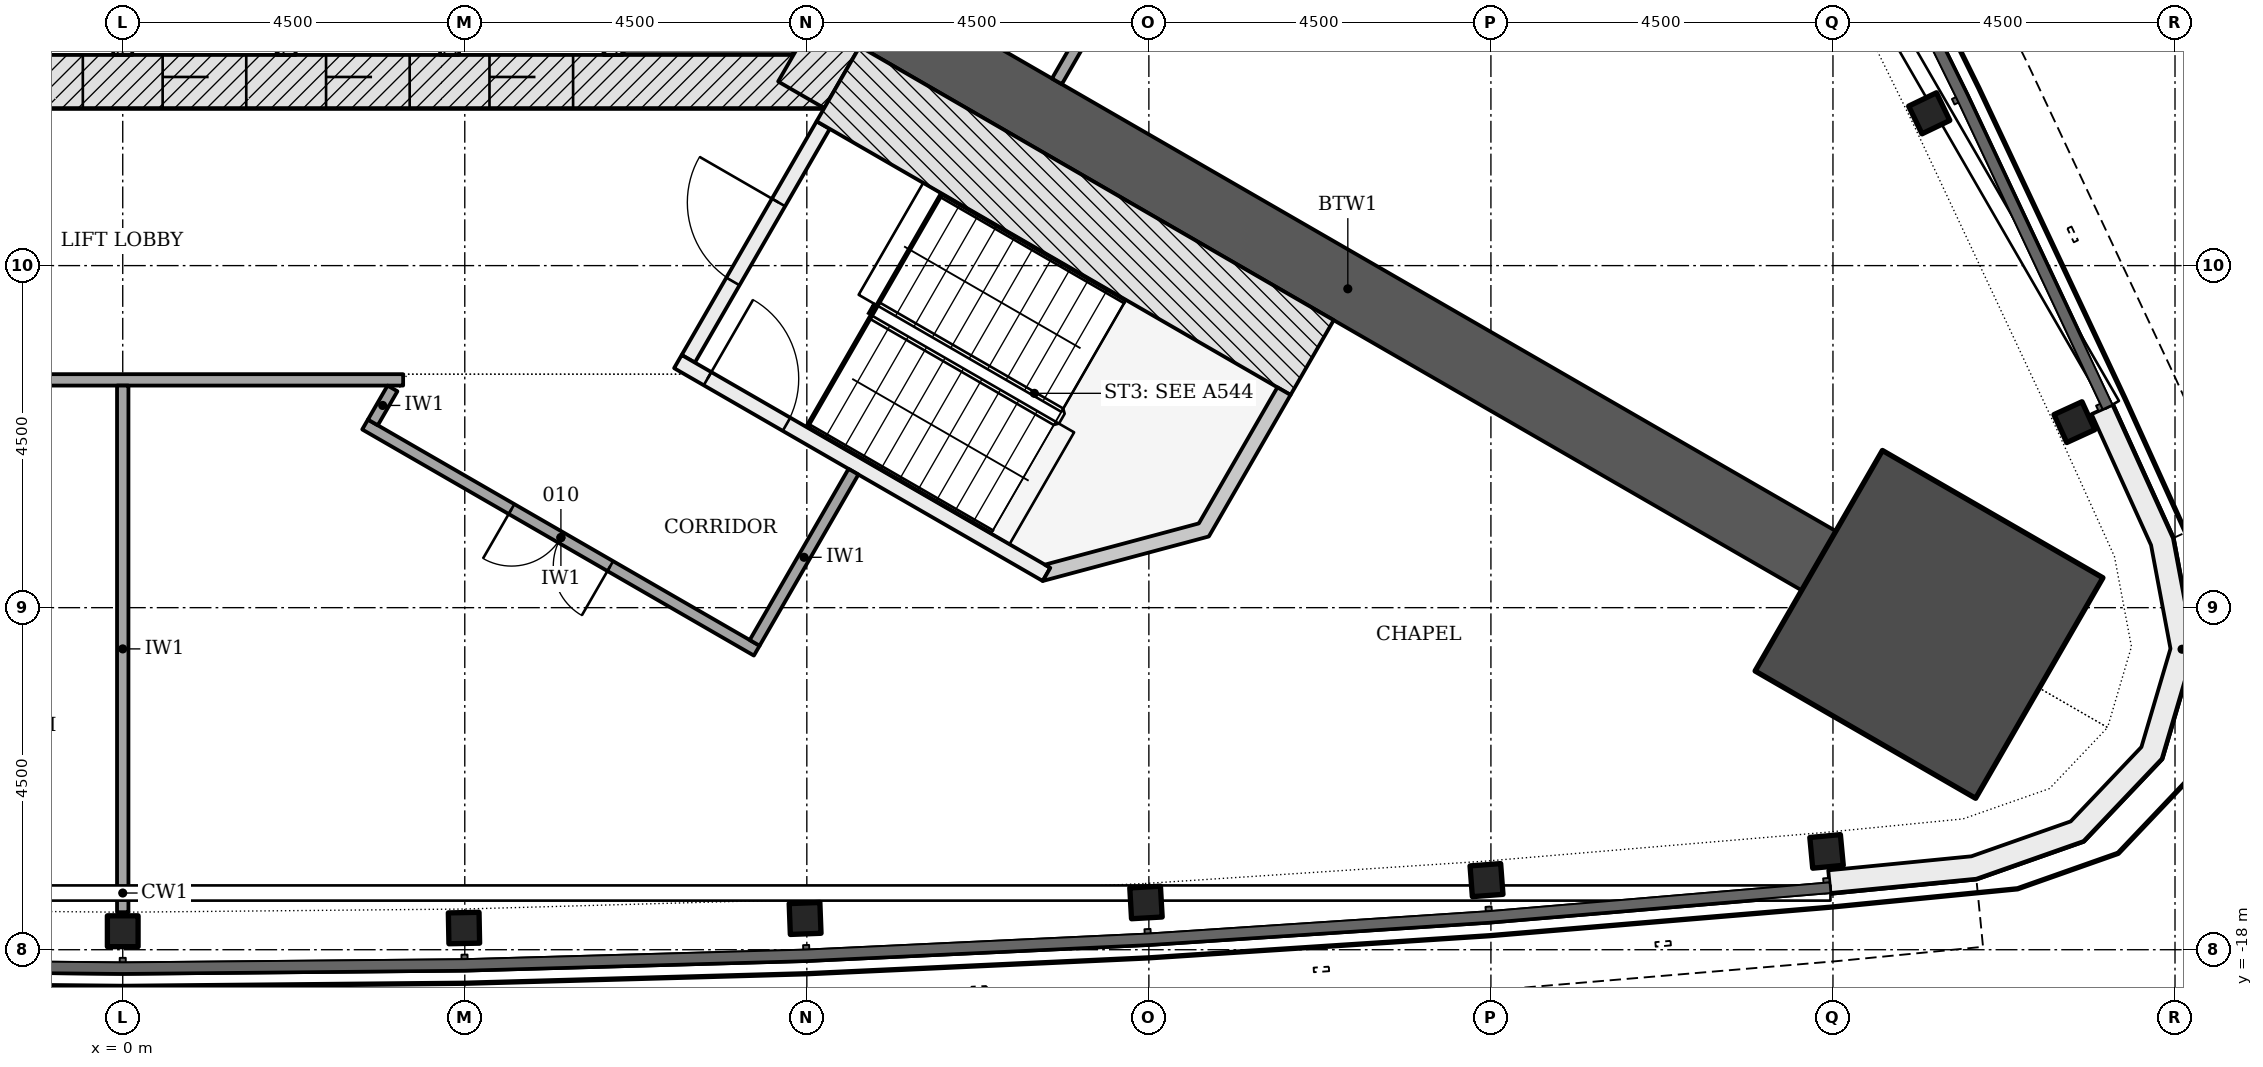
"""IFC4 building model, lengths in metres.
Left out: names, types, materials, properties, quantities, classifications, styles, units other than length and angle.
Written with IfcOpenShell. Run it as: python <this file> out.ifc"""

import sys

from ifc_helpers import new_model, si_unit, direction, frame, frame_2d, origin, origin_2d, place, context, subcontext, project, spatial, polyline, rectangle, i_section, outline, extrude, element, fill, save


model = new_model("IFC4")
c1 = context("Model", 3, precision=1e-05, world=origin(), true_north=direction((0.0, 1.0)))
c2 = subcontext(c1, "Body", "Model", "MODEL_VIEW")
j1 = project(units=[si_unit("LENGTHUNIT", "METRE"), si_unit("PLANEANGLEUNIT", "RADIAN")], contexts=[c1])
p1 = place(None, origin())
s1 = spatial("IfcSite", under=j1, at=p1, CompositionType="ELEMENT")
p2 = place(p1, origin())
s2 = spatial("IfcBuilding", under=s1, at=p2, CompositionType="ELEMENT")
p3 = place(p2, frame((0.0, 0.0, 34.8)))
s3 = spatial("IfcBuildingStorey", under=s2, at=p3, CompositionType="ELEMENT", Elevation=34.8)
p4 = place(p3, frame((-9.229, -6.578, -0.2), z_axis=(0.0, 0.0, 1.0), x_axis=(1.0, 0.0, 0.0)))
e1 = element("IfcWall", 1, at=p4, inside=s3, PredefinedType="SHEAR", context=c2, shape_type="SweptSolid", body=[
    extrude(rectangle(XDim=18.458, YDim=0.7, at=frame_2d((9.229, 0.0))), origin(), (0.0, 0.0, 1.0), 3.6),
])
p5 = place(p4, frame((3.304, 0.0, 0.2)))
e2 = element("IfcOpeningElement", 2, at=p5, cuts=e1, PredefinedType="OPENING", context=c2, shape_type="SweptSolid", body=[
    extrude(rectangle(XDim=1.1, YDim=2.1, at=frame_2d((0.55, 1.05))), frame((0.0, 0.36, 0.0), z_axis=(0.0, -1.0, 0.0), x_axis=(1.0, 0.0, 0.0)), (0.0, 0.0, 1.0), 0.72),
])
p6 = place(p4, frame((5.454, 0.0, 0.2)))
e3 = element("IfcOpeningElement", 3, at=p6, cuts=e1, PredefinedType="OPENING", context=c2, shape_type="SweptSolid", body=[
    extrude(rectangle(XDim=1.1, YDim=2.1, at=frame_2d((0.55, 1.05))), frame((0.0, 0.36, 0.0), z_axis=(0.0, -1.0, 0.0), x_axis=(1.0, 0.0, 0.0)), (0.0, 0.0, 1.0), 0.72),
])
p7 = place(p4, frame((7.604, 0.0, 0.2)))
e4 = element("IfcOpeningElement", 4, at=p7, cuts=e1, PredefinedType="OPENING", context=c2, shape_type="SweptSolid", body=[
    extrude(rectangle(XDim=1.1, YDim=2.1, at=frame_2d((0.55, 1.05))), frame((0.0, 0.36, 0.0), z_axis=(0.0, -1.0, 0.0), x_axis=(1.0, 0.0, 0.0)), (0.0, 0.0, 1.0), 0.72),
])
p8 = place(p4, frame((9.754, 0.0, 0.2)))
e5 = element("IfcOpeningElement", 5, at=p8, cuts=e1, PredefinedType="OPENING", context=c2, shape_type="SweptSolid", body=[
    extrude(rectangle(XDim=1.1, YDim=2.1, at=frame_2d((0.55, 1.05))), frame((0.0, 0.36, 0.0), z_axis=(0.0, -1.0, 0.0), x_axis=(1.0, 0.0, 0.0)), (0.0, 0.0, 1.0), 0.72),
])
p9 = place(p4, frame((11.904, 0.0, 0.2)))
e6 = element("IfcOpeningElement", 6, at=p9, cuts=e1, PredefinedType="OPENING", context=c2, shape_type="SweptSolid", body=[
    extrude(rectangle(XDim=1.1, YDim=2.1, at=frame_2d((0.55, 1.05))), frame((0.0, 0.36, 0.0), z_axis=(0.0, -1.0, 0.0), x_axis=(1.0, 0.0, 0.0)), (0.0, 0.0, 1.0), 0.72),
])
p10 = place(p4, frame((14.054, 0.0, 0.2)))
e7 = element("IfcOpeningElement", 7, at=p10, cuts=e1, PredefinedType="OPENING", context=c2, shape_type="SweptSolid", body=[
    extrude(rectangle(XDim=1.1, YDim=2.1, at=frame_2d((0.55, 1.05))), frame((0.0, 0.36, 0.0), z_axis=(0.0, -1.0, 0.0), x_axis=(1.0, 0.0, 0.0)), (0.0, 0.0, 1.0), 0.72),
])
p11 = place(p4, frame((1.079, 0.0, 0.2)))
e8 = element("IfcOpeningElement", 8, at=p11, cuts=e1, PredefinedType="OPENING", context=c2, shape_type="SweptSolid", body=[
    extrude(rectangle(XDim=0.9, YDim=2.1, at=frame_2d((0.45, 1.05))), frame((0.0, 0.36, 0.0), z_axis=(0.0, -1.0, 0.0), x_axis=(1.0, 0.0, 0.0)), (0.0, 0.0, 1.0), 0.72),
])
p12 = place(p3, frame((8.926, -6.753, -0.2), z_axis=(0.0, 0.0, 1.0), x_axis=(0.500042739161, 0.866000726912, 0.0)))
e9 = element("IfcWall", 9, at=p12, inside=s3, PredefinedType="SHEAR", context=c2, shape_type="SweptSolid", body=[
    extrude(rectangle(XDim=2.771, YDim=0.7, at=frame_2d((1.386, 0.0))), origin(), (0.0, 0.0, 1.0), 3.6),
])
p13 = place(p3, frame((9.922, -5.728, -0.2), z_axis=(0.0, 0.0, 1.0), x_axis=(0.866025331845, -0.500000124603, 0.0)))
e10 = element("IfcWall", 10, at=p13, inside=s3, PredefinedType="SHEAR", context=c2, shape_type="SweptSolid", body=[
    extrude(rectangle(XDim=14.309, YDim=0.9, at=frame_2d((7.154, 0.0))), origin(), (0.0, 0.0, 1.0), 3.6),
])
p14 = place(p3, frame((23.764, -13.72, -0.2), z_axis=(0.0, 0.0, 1.0), x_axis=(0.866025403784, -0.5, 0.0)))
e11 = element("IfcColumn", 11, at=p14, inside=s3, PredefinedType="COLUMN", context=c2, shape_type="SweptSolid", body=[
    extrude(rectangle(XDim=3.35, YDim=3.35, at=origin_2d()), origin(), (0.0, 0.0, 1.0), 3.6),
])
for number, where, z_axis, x_axis in (
    (12, (0.0, -17.757, -0.2), (0.0, 0.0, 1.0), (1.0, 0.0, 0.0)),
    (13, (4.49, -17.715, -0.2), (0.0, 0.0, 1.0), (1.0, 0.019, 0.0)),
    (14, (8.977, -17.589, -0.2), (0.0, 0.0, 1.0), (0.999, 0.037, 0.0)),
    (15, (13.462, -17.379, -0.2), (0.0, 0.0, 1.0), (0.998, 0.056, 0.0)),
    (16, (17.942, -17.084, -0.2), (0.0, 0.0, 1.0), (0.997, 0.075, 0.0)),
    (17, (22.416, -16.707, -0.2), (0.0, 0.0, 1.0), (0.996, 0.094, 0.0)),
    (18, (25.676, -11.059, -0.2), (0.0, 0.0, 1.0), (-0.417, 0.909, 0.0)),
    (19, (23.767, -6.996, -0.2), (0.0, 0.0, 1.0), (-0.434, 0.901, 0.0)),
):
    element("IfcColumn", number, at=place(p3, frame(where, z_axis=z_axis, x_axis=x_axis)), inside=s3, PredefinedType="COLUMN", context=c2, shape_type="SweptSolid", body=[
        extrude(i_section(OverallWidth=0.404, OverallDepth=0.406, WebThickness=0.027, FlangeThickness=0.044, FilletRadius=0.015, at=origin_2d()), origin(), (0.0, 0.0, 1.0), 3.6),
    ])
p15 = place(p3, origin())
e20 = element("IfcWall", 20, at=p15, inside=s3, PredefinedType="NOTDEFINED", context=c2, shape_type="SweptSolid", body=[
    extrude(outline(polyline([(22.467, -17.254), (24.386, -17.066), (25.796, -16.571), (26.825, -15.488), (27.249, -14.055), (26.973, -12.586), (26.176, -10.83), (25.903, -10.954), (26.685, -12.677), (26.94, -14.039), (26.558, -15.333), (25.628, -16.312), (24.321, -16.771), (22.438, -16.956), (22.467, -17.254)])), origin(), (0.0, 0.0, 1.0), 3.3),
])
for number, where, z_axis, x_axis in (
    (21, (0.0, -6.228, -0.2), (0.0, 0.0, 1.0), (0.0, 1.0, 0.0)),
    (22, (2.15, -6.228, -0.2), (0.0, 0.0, 1.0), (0.0, 1.0, 0.0)),
    (23, (4.3, -6.228, -0.2), (0.0, 0.0, 1.0), (0.0, 1.0, 0.0)),
    (24, (6.45, -6.228, -0.2), (0.0, 0.0, 1.0), (0.0, 1.0, 0.0)),
):
    element("IfcWall", number, at=place(p3, frame(where, z_axis=z_axis, x_axis=x_axis)), inside=s3, PredefinedType="PARTITIONING", context=c2, shape_type="SweptSolid", body=[
        extrude(rectangle(XDim=2.5, YDim=0.25, at=frame_2d((1.25, 0.0))), origin(), (0.0, 0.0, 1.0), 3.6),
    ])
p16 = place(p3, frame((7.44, -10.226, -0.2), z_axis=(0.0, 0.0, 1.0), x_axis=(0.500022077904, 0.866012656725, 0.0)))
e25 = element("IfcWall", 25, at=p16, inside=s3, PredefinedType="SHEAR", context=c2, shape_type="SweptSolid", body=[
    extrude(rectangle(XDim=3.55, YDim=0.2, at=frame_2d((1.775, 0.0))), origin(), (0.0, 0.0, 1.0), 3.6),
])
p17 = place(p16, frame((1.175, 0.0, 0.2)))
e26 = element("IfcOpeningElement", 26, at=p17, cuts=e25, PredefinedType="OPENING", context=c2, shape_type="SweptSolid", body=[
    extrude(rectangle(XDim=1.2, YDim=2.1, at=frame_2d((0.6, 1.05))), frame((0.0, 0.11, 0.0), z_axis=(0.0, -1.0, 0.0), x_axis=(1.0, 0.0, 0.0)), (0.0, 0.0, 1.0), 0.22),
])
p18 = place(p3, frame((7.304, -10.262, -0.2), z_axis=(0.0, 0.0, 1.0), x_axis=(0.866026594901, -0.49999793692, 0.0)))
e27 = element("IfcWall", 27, at=p18, inside=s3, PredefinedType="SHEAR", context=c2, shape_type="SweptSolid", body=[
    extrude(rectangle(XDim=5.6, YDim=0.2, at=frame_2d((2.8, 0.0))), origin(), (0.0, 0.0, 1.0), 3.6),
])
p19 = place(p18, frame((0.45, 0.0, 0.2)))
e28 = element("IfcOpeningElement", 28, at=p19, cuts=e27, PredefinedType="OPENING", context=c2, shape_type="SweptSolid", body=[
    extrude(rectangle(XDim=1.2, YDim=2.1, at=frame_2d((0.6, 1.05))), frame((0.0, 0.11, 0.0), z_axis=(0.0, -1.0, 0.0), x_axis=(1.0, 0.0, 0.0)), (0.0, 0.0, 1.0), 0.22),
])
p20 = place(p3, frame((9.413, -6.61, -0.2), z_axis=(0.0, 0.0, 1.0), x_axis=(0.866018442252, -0.500012057535, 0.0)))
e29 = element("IfcWall", 29, at=p20, inside=s3, PredefinedType="SHEAR", context=c2, shape_type="SweptSolid", body=[
    extrude(rectangle(XDim=7.2, YDim=1.136, at=frame_2d((3.6, 0.0))), origin(), (0.0, 0.0, 1.0), 3.6),
])
p21 = place(p3, frame((0.0, 0.0, -0.2)))
e30 = element("IfcWall", 30, at=p21, inside=s3, PredefinedType="SHEAR", context=c2, shape_type="SweptSolid", body=[
    extrude(outline(polyline([(12.104, -13.149), (14.289, -12.563), (15.364, -10.701), (15.191, -10.601), (14.157, -12.392), (12.132, -12.934), (12.204, -12.976), (12.204, -12.976), (12.204, -12.976), (12.204, -12.976), (12.204, -12.976), (12.204, -12.976), (12.204, -12.976), (12.204, -12.976), (12.204, -12.976), (12.204, -12.976), (12.204, -12.976), (12.204, -12.976), (12.204, -12.976), (12.204, -12.976), (12.204, -12.976), (12.204, -12.976), (12.204, -12.976), (12.104, -13.149)])), origin(), (0.0, 0.0, 1.0), 3.6),
])
p22 = place(p3, frame((3.689, -10.503, 0.0), z_axis=(0.0, 0.0, 1.0), x_axis=(-1.0, 0.0, 0.0)))
e31 = element("IfcWall", 31, at=p22, inside=s3, PredefinedType="PARTITIONING", context=c2, shape_type="SweptSolid", body=[
    extrude(rectangle(XDim=13.068, YDim=0.15, at=frame_2d((6.534, 0.0))), origin(), (0.0, 0.0, 1.0), 2.768),
])
p23 = place(p22, frame((10.617, 0.0, 0.0)))
e32 = element("IfcOpeningElement", 32, at=p23, cuts=e31, PredefinedType="OPENING", context=c2, shape_type="SweptSolid", body=[
    extrude(rectangle(XDim=1.0, YDim=2.1, at=frame_2d((0.5, 1.05))), frame((0.0, 0.085, 0.0), z_axis=(0.0, -1.0, 0.0), x_axis=(1.0, 0.0, 0.0)), (0.0, 0.0, 1.0), 0.17),
])
p24 = place(p22, frame((8.054, 0.0, 0.0)))
e33 = element("IfcOpeningElement", 33, at=p24, cuts=e31, PredefinedType="OPENING", context=c2, shape_type="SweptSolid", body=[
    extrude(rectangle(XDim=1.0, YDim=2.1, at=frame_2d((0.5, 1.05))), frame((0.0, 0.085, 0.0), z_axis=(0.0, -1.0, 0.0), x_axis=(1.0, 0.0, 0.0)), (0.0, 0.0, 1.0), 0.17),
])
p25 = place(p22, frame((4.734, 0.0, 0.0)))
e34 = element("IfcOpeningElement", 34, at=p25, cuts=e31, PredefinedType="OPENING", context=c2, shape_type="SweptSolid", body=[
    extrude(rectangle(XDim=1.5, YDim=2.1, at=frame_2d((0.75, 1.05))), frame((0.0, 0.085, 0.0), z_axis=(0.0, -1.0, 0.0), x_axis=(1.0, 0.0, 0.0)), (0.0, 0.0, 1.0), 0.17),
])
p26 = place(p3, frame((8.341, -14.066, 0.0), z_axis=(0.0, 0.0, 1.0), x_axis=(-0.866017493347, 0.500013701029, 0.0)))
e35 = element("IfcWall", 35, at=p26, inside=s3, PredefinedType="PARTITIONING", context=c2, shape_type="SweptSolid", body=[
    extrude(rectangle(XDim=5.95, YDim=0.15, at=frame_2d((2.975, 0.0))), origin(), (0.0, 0.0, 1.0), 2.768),
])
p27 = place(p26, frame((2.225, 0.0, 0.0)))
e36 = element("IfcOpeningElement", 36, at=p27, cuts=e35, PredefinedType="OPENING", context=c2, shape_type="SweptSolid", body=[
    extrude(rectangle(XDim=1.5, YDim=2.1, at=frame_2d((0.75, 1.05))), frame((0.0, 0.085, 0.0), z_axis=(0.0, -1.0, 0.0), x_axis=(1.0, 0.0, 0.0)), (0.0, 0.0, 1.0), 0.17),
])
p28 = place(p3, frame((8.314, -13.963, 0.0), z_axis=(0.0, 0.0, 1.0), x_axis=(0.499936506574, 0.866062058628, 0.0)))
e37 = element("IfcWall", 37, at=p28, inside=s3, PredefinedType="PARTITIONING", context=c2, shape_type="SweptSolid", body=[
    extrude(rectangle(XDim=2.6, YDim=0.15, at=frame_2d((1.3, 0.0))), origin(), (0.0, 0.0, 1.0), 2.923),
])
p29 = place(p3, frame((12.29, -6.576, 0.0), z_axis=(0.0, 0.0, 1.0), x_axis=(0.499946688677, 0.866056180903, 0.0)))
e38 = element("IfcWall", 38, at=p29, inside=s3, PredefinedType="PARTITIONING", context=c2, shape_type="SweptSolid", body=[
    extrude(rectangle(XDim=2.262, YDim=0.15, at=frame_2d((1.131, 0.0))), origin(), (0.0, 0.0, 1.0), 3.4),
])
p30 = place(p3, frame((3.291, -11.063, 0.0), z_axis=(0.0, 0.0, 1.0), x_axis=(0.499899694197, 0.866083307622, 0.0)))
e39 = element("IfcWall", 39, at=p30, inside=s3, PredefinedType="PARTITIONING", context=c2, shape_type="SweptSolid", body=[
    extrude(rectangle(XDim=0.517, YDim=0.15, at=frame_2d((0.258, 0.0))), origin(), (0.0, 0.0, 1.0), 3.4),
])
p31 = place(p3, frame((0.0, -17.507, 0.0), z_axis=(0.0, 0.0, 1.0), x_axis=(0.0, 1.0, 0.0)))
e40 = element("IfcWall", 40, at=p31, inside=s3, PredefinedType="PARTITIONING", context=c2, shape_type="SweptSolid", body=[
    extrude(rectangle(XDim=6.929, YDim=0.15, at=frame_2d((3.464, 0.0))), origin(), (0.0, 0.0, 1.0), 2.768),
])
p32 = place(p7, origin())
e41 = element("IfcDoor", 41, at=p32, inside=s3, OperationType="DOUBLE_DOOR_SLIDING", PredefinedType="DOOR", context=c2, shape_type="SweptSolid", body=[
    extrude(rectangle(XDim=1.1, YDim=2.1, at=frame_2d((0.55, 1.05))), frame((0.0, 0.025, 0.0), z_axis=(0.0, -1.0, 0.0), x_axis=(1.0, 0.0, 0.0)), (0.0, 0.0, 1.0), 0.05),
])
fill(e4, e41)
p33 = place(p8, origin())
e42 = element("IfcDoor", 42, at=p33, inside=s3, OperationType="DOUBLE_DOOR_SLIDING", PredefinedType="DOOR", context=c2, shape_type="SweptSolid", body=[
    extrude(rectangle(XDim=1.1, YDim=2.1, at=frame_2d((0.55, 1.05))), frame((0.0, 0.025, 0.0), z_axis=(0.0, -1.0, 0.0), x_axis=(1.0, 0.0, 0.0)), (0.0, 0.0, 1.0), 0.05),
])
fill(e5, e42)
p34 = place(p9, origin())
e43 = element("IfcDoor", 43, at=p34, inside=s3, OperationType="DOUBLE_DOOR_SLIDING", PredefinedType="DOOR", context=c2, shape_type="SweptSolid", body=[
    extrude(rectangle(XDim=1.1, YDim=2.1, at=frame_2d((0.55, 1.05))), frame((0.0, 0.025, 0.0), z_axis=(0.0, -1.0, 0.0), x_axis=(1.0, 0.0, 0.0)), (0.0, 0.0, 1.0), 0.05),
])
fill(e6, e43)
p35 = place(p10, origin())
e44 = element("IfcDoor", 44, at=p35, inside=s3, OperationType="DOUBLE_DOOR_SLIDING", PredefinedType="DOOR", context=c2, shape_type="SweptSolid", body=[
    extrude(rectangle(XDim=1.1, YDim=2.1, at=frame_2d((0.55, 1.05))), frame((0.0, 0.025, 0.0), z_axis=(0.0, -1.0, 0.0), x_axis=(1.0, 0.0, 0.0)), (0.0, 0.0, 1.0), 0.05),
])
fill(e7, e44)
p36 = place(p17, origin())
e45 = element("IfcDoor", 45, at=p36, inside=s3, OperationType="SINGLE_SWING_RIGHT", PredefinedType="DOOR", context=c2, shape_type="SweptSolid", body=[
    extrude(rectangle(XDim=1.2, YDim=2.1, at=frame_2d((0.6, 1.05))), frame((0.0, 0.025, 0.0), z_axis=(0.0, -1.0, 0.0), x_axis=(1.0, 0.0, 0.0)), (0.0, 0.0, 1.0), 0.05),
])
fill(e26, e45)
p37 = place(p19, origin())
e46 = element("IfcDoor", 46, at=p37, inside=s3, OperationType="SINGLE_SWING_LEFT", PredefinedType="DOOR", context=c2, shape_type="SweptSolid", body=[
    extrude(rectangle(XDim=1.2, YDim=2.1, at=frame_2d((0.6, 1.05))), frame((0.0, 0.025, 0.0), z_axis=(0.0, -1.0, 0.0), x_axis=(1.0, 0.0, 0.0)), (0.0, 0.0, 1.0), 0.05),
])
fill(e28, e46)
p38 = place(p27, origin())
e47 = element("IfcDoor", 47, at=p38, inside=s3, OperationType="DOUBLE_DOOR_SINGLE_SWING", PredefinedType="DOOR", context=c2, shape_type="SweptSolid", body=[
    extrude(rectangle(XDim=1.5, YDim=2.1, at=frame_2d((0.75, 1.05))), frame((0.0, 0.025, 0.0), z_axis=(0.0, -1.0, 0.0), x_axis=(1.0, 0.0, 0.0)), (0.0, 0.0, 1.0), 0.05),
])
fill(e36, e47)
save(model, sys.argv[1])
